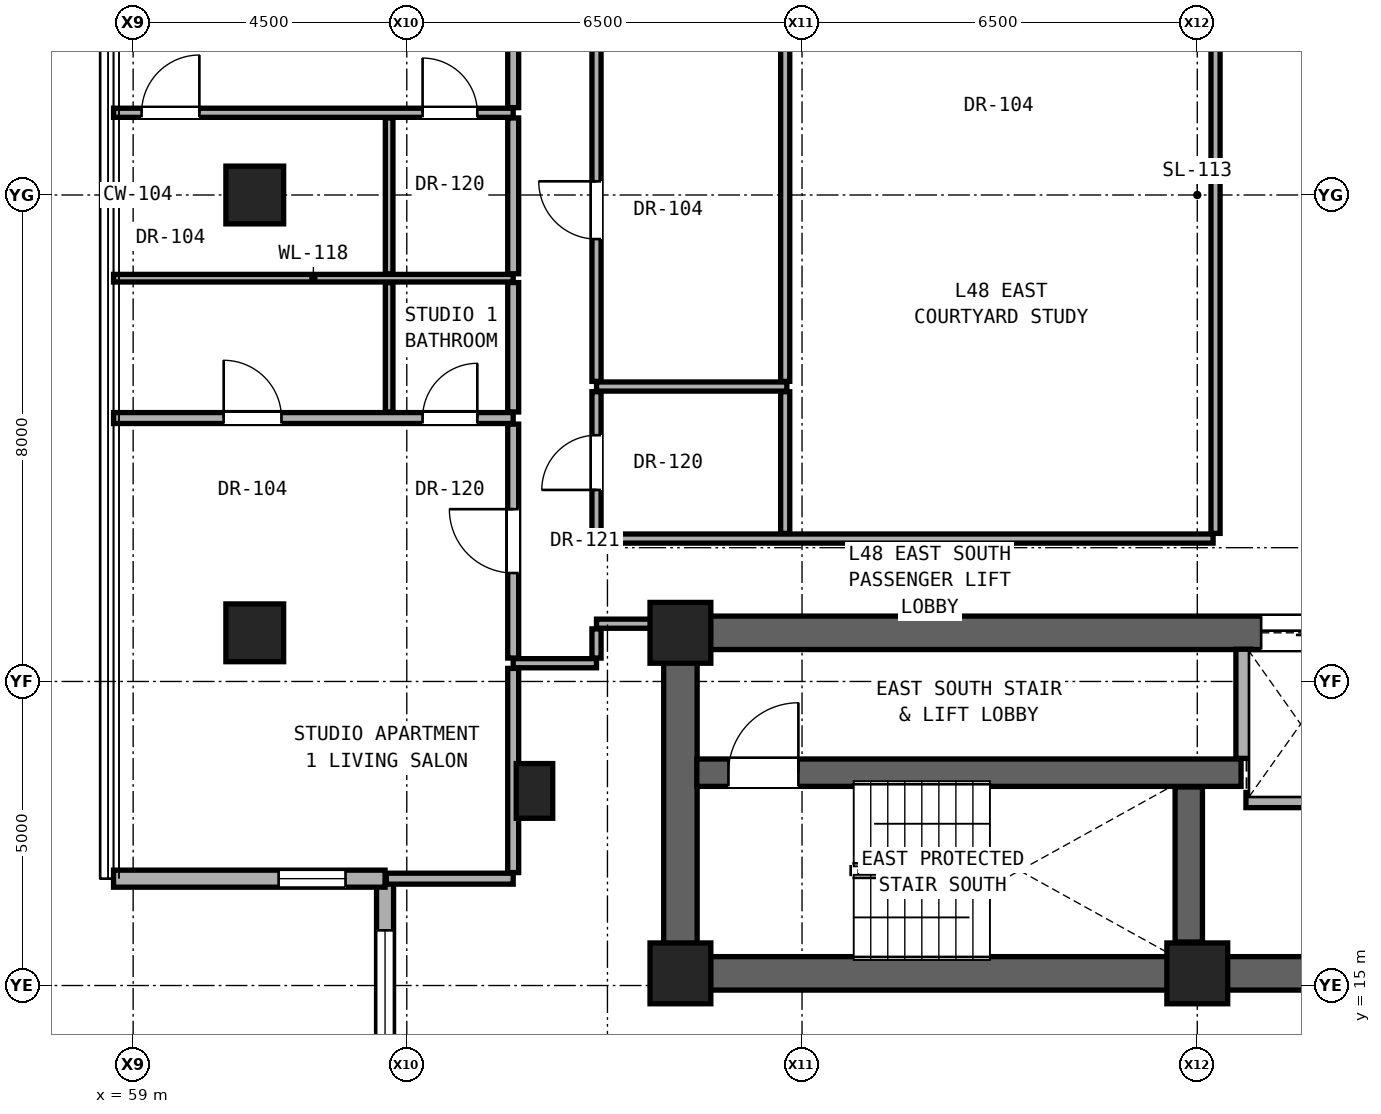
"""IFC4 building model, lengths in metres.
Left out: names, types, materials, properties, quantities, classifications, styles, units other than length and angle.
Written with IfcOpenShell. Run it as: python <this file> out.ifc"""

import sys

from ifc_helpers import new_model, si_unit, direction, frame, frame_2d, origin, origin_2d, place, context, subcontext, project, spatial, rectangle, hollow_rectangle, extrude, element, fill, save


model = new_model("IFC4")
c1 = context("Model", 3, precision=1e-05, world=origin(), true_north=direction((0.0, 1.0)))
c2 = subcontext(c1, "Body", "Model", "MODEL_VIEW")
j1 = project(units=[si_unit("LENGTHUNIT", "METRE"), si_unit("PLANEANGLEUNIT", "RADIAN")], contexts=[c1])
p1 = place(None, origin())
s1 = spatial("IfcSite", under=j1, at=p1, CompositionType="ELEMENT")
p2 = place(p1, origin())
s2 = spatial("IfcBuilding", under=s1, at=p2, CompositionType="ELEMENT")
p3 = place(p2, frame((0.0, 0.0, 170.65)))
s3 = spatial("IfcBuildingStorey", under=s2, at=p3, CompositionType="ELEMENT", Elevation=170.65)
for number, where, z_axis, x_axis in (
    (1, (68.0, 15.2, 0.0), (0.0, 0.0, 1.0), (1.0, 0.0, 0.0)),
    (2, (76.5, 15.2, 0.0), (0.0, 0.0, 1.0), (1.0, 0.0, 0.0)),
    (3, (68.0, 20.8, 0.0), (0.0, 0.0, 1.0), (1.0, 0.0, 0.0)),
):
    element("IfcColumn", number, at=place(p3, frame(where, z_axis=z_axis, x_axis=x_axis)), inside=s3, PredefinedType="COLUMN", context=c2, shape_type="SweptSolid", body=[
        extrude(rectangle(XDim=1.0, YDim=1.0, at=origin_2d()), origin(), (0.0, 0.0, 1.0), 3.25),
    ])
for number, where, z_axis, x_axis in (
    (4, (61.0, 20.8, 0.0), (0.0, 0.0, 1.0), (1.0, 0.0, 0.0)),
    (5, (61.0, 28.0, 0.0), (0.0, 0.0, 1.0), (1.0, 0.0, 0.0)),
):
    element("IfcColumn", number, at=place(p3, frame(where, z_axis=z_axis, x_axis=x_axis)), inside=s3, PredefinedType="COLUMN", context=c2, shape_type="SweptSolid", body=[
        extrude(hollow_rectangle(XDim=0.95, YDim=0.95, WallThickness=0.05, at=origin_2d()), origin(), (0.0, 0.0, 1.0), 3.25),
    ])
p4 = place(p3, frame((65.6, 18.2, 0.0), z_axis=(0.0, 0.0, 1.0), x_axis=(1.0, 0.0, 0.0)))
e6 = element("IfcColumn", 6, at=p4, inside=s3, PredefinedType="PILASTER", context=c2, shape_type="SweptSolid", body=[
    extrude(rectangle(XDim=0.6, YDim=0.9, at=origin_2d()), origin(), (0.0, 0.0, 1.0), 3.25),
])
p5 = place(p3, frame((68.0, 15.2, 0.0), z_axis=(0.0, 0.0, 1.0), x_axis=(1.0, 0.0, 0.0)))
e7 = element("IfcWall", 7, at=p5, inside=s3, PredefinedType="SHEAR", context=c2, shape_type="SweptSolid", body=[
    extrude(rectangle(XDim=17.0, YDim=0.55, at=frame_2d((8.5, 0.0))), origin(), (0.0, 0.0, 1.0), 3.05),
])
p6 = place(p3, frame((68.0, 15.2, 0.0), z_axis=(0.0, 0.0, 1.0), x_axis=(0.0, 1.0, 0.0)))
e8 = element("IfcWall", 8, at=p6, inside=s3, PredefinedType="SHEAR", context=c2, shape_type="SweptSolid", body=[
    extrude(rectangle(XDim=5.6, YDim=0.55, at=frame_2d((2.8, 0.0))), origin(), (0.0, 0.0, 1.0), 3.05),
])
p7 = place(p3, frame((68.0, 20.8, 0.0), z_axis=(0.0, 0.0, 1.0), x_axis=(1.0, 0.0, 0.0)))
e9 = element("IfcWall", 9, at=p7, inside=s3, PredefinedType="SHEAR", context=c2, shape_type="SweptSolid", body=[
    extrude(rectangle(XDim=17.0, YDim=0.55, at=frame_2d((8.5, 0.0))), origin(), (0.0, 0.0, 1.0), 3.05),
])
p8 = place(p7, frame((9.55, 0.0, 0.0)))
e10 = element("IfcOpeningElement", 10, at=p8, cuts=e9, PredefinedType="OPENING", context=c2, shape_type="SweptSolid", body=[
    extrude(rectangle(XDim=1.3, YDim=2.3, at=frame_2d((0.65, 1.15))), frame((0.0, 0.285, 0.0), z_axis=(0.0, -1.0, 0.0), x_axis=(1.0, 0.0, 0.0)), (0.0, 0.0, 1.0), 0.57),
])
p9 = place(p7, frame((12.05, 0.0, 0.0)))
e11 = element("IfcOpeningElement", 11, at=p9, cuts=e9, PredefinedType="OPENING", context=c2, shape_type="SweptSolid", body=[
    extrude(rectangle(XDim=1.3, YDim=2.3, at=frame_2d((0.65, 1.15))), frame((0.0, 0.285, 0.0), z_axis=(0.0, -1.0, 0.0), x_axis=(1.0, 0.0, 0.0)), (0.0, 0.0, 1.0), 0.57),
])
p10 = place(p3, frame((63.143, 16.757, 0.0), z_axis=(0.0, 0.0, 1.0), x_axis=(0.0, -1.0, 0.0)))
e12 = element("IfcWall", 12, at=p10, inside=s3, PredefinedType="SOLIDWALL", context=c2, shape_type="SweptSolid", body=[
    extrude(rectangle(XDim=4.465, YDim=0.28, at=frame_2d((2.232, 0.0))), origin(), (0.0, 0.0, 1.0), 3.03),
])
p11 = place(p10, frame((0.85, 0.0, 0.68)))
e13 = element("IfcOpeningElement", 13, at=p11, cuts=e12, PredefinedType="OPENING", context=c2, shape_type="SweptSolid", body=[
    extrude(rectangle(XDim=2.1, YDim=2.2, at=frame_2d((1.05, 1.1))), frame((0.0, 0.15, 0.0), z_axis=(0.0, -1.0, 0.0), x_axis=(1.0, 0.0, 0.0)), (0.0, 0.0, 1.0), 0.3),
])
p12 = place(p3, frame((58.677, 16.757, 0.0), z_axis=(0.0, 0.0, 1.0), x_axis=(1.0, 0.0, 0.0)))
e14 = element("IfcWall", 14, at=p12, inside=s3, PredefinedType="SOLIDWALL", context=c2, shape_type="SweptSolid", body=[
    extrude(rectangle(XDim=4.465, YDim=0.28, at=frame_2d((2.232, 0.0))), origin(), (0.0, 0.0, 1.0), 3.03),
])
p13 = place(p12, frame((2.715, 0.0, 0.85)))
e15 = element("IfcOpeningElement", 15, at=p13, cuts=e14, PredefinedType="OPENING", context=c2, shape_type="SweptSolid", body=[
    extrude(rectangle(XDim=1.1, YDim=2.0, at=frame_2d((0.55, 1.0))), frame((0.0, 0.15, 0.0), z_axis=(0.0, -1.0, 0.0), x_axis=(1.0, 0.0, 0.0)), (0.0, 0.0, 1.0), 0.3),
])
p14 = place(p3, frame((63.163, 16.757, 0.0), z_axis=(0.0, 0.0, 1.0), x_axis=(1.0, 0.0, 0.0)))
e16 = element("IfcWall", 16, at=p14, inside=s3, PredefinedType="PARTITIONING", context=c2, shape_type="SweptSolid", body=[
    extrude(rectangle(XDim=2.087, YDim=0.18, at=frame_2d((1.044, 0.0))), origin(), (0.0, 0.0, 1.0), 3.05),
])
p15 = place(p3, frame((77.3, 18.05, 0.0), z_axis=(0.0, 0.0, 1.0), x_axis=(1.0, 0.0, 0.0)))
e17 = element("IfcWall", 17, at=p15, inside=s3, PredefinedType="SOLIDWALL", context=c2, shape_type="SweptSolid", body=[
    extrude(rectangle(XDim=4.35, YDim=0.25, at=frame_2d((2.175, 0.0))), origin(), (0.0, 0.0, 1.0), 3.05),
])
p16 = place(p3, frame((68.27, 18.5, 0.0), z_axis=(0.0, 0.0, 1.0), x_axis=(1.0, 0.0, 0.0)))
e18 = element("IfcWall", 18, at=p16, inside=s3, PredefinedType="SHEAR", context=c2, shape_type="SweptSolid", body=[
    extrude(rectangle(XDim=8.95, YDim=0.45, at=frame_2d((4.475, 0.0))), origin(), (0.0, 0.0, 1.0), 3.05),
])
p17 = place(p16, frame((0.52, 0.0, 0.0)))
e19 = element("IfcOpeningElement", 19, at=p17, cuts=e18, PredefinedType="OPENING", context=c2, shape_type="SweptSolid", body=[
    extrude(rectangle(XDim=1.15, YDim=2.2, at=frame_2d((0.575, 1.1))), frame((0.0, 0.235, 0.0), z_axis=(0.0, -1.0, 0.0), x_axis=(1.0, 0.0, 0.0)), (0.0, 0.0, 1.0), 0.47),
])
p18 = place(p3, frame((65.25, 20.3, 0.0), z_axis=(0.0, 0.0, 1.0), x_axis=(1.0, 0.0, 0.0)))
e20 = element("IfcWall", 20, at=p18, inside=s3, PredefinedType="PARTITIONING", context=c2, shape_type="SweptSolid", body=[
    extrude(rectangle(XDim=1.37, YDim=0.15, at=frame_2d((0.685, 0.0))), origin(), (0.0, 0.0, 1.0), 3.05),
])
p19 = place(p3, frame((66.62, 20.95, 0.0), z_axis=(0.0, 0.0, 1.0), x_axis=(1.0, 0.0, 0.0)))
e21 = element("IfcWall", 21, at=p19, inside=s3, PredefinedType="PARTITIONING", context=c2, shape_type="SweptSolid", body=[
    extrude(rectangle(XDim=1.11, YDim=0.15, at=frame_2d((0.555, 0.0))), origin(), (0.0, 0.0, 1.0), 2.442),
])
p20 = place(p3, frame((66.62, 22.35, 0.0), z_axis=(0.0, 0.0, 1.0), x_axis=(1.0, 0.0, 0.0)))
e22 = element("IfcWall", 22, at=p20, inside=s3, PredefinedType="PARTITIONING", context=c2, shape_type="SweptSolid", body=[
    extrude(rectangle(XDim=10.14, YDim=0.15, at=frame_2d((5.07, 0.0))), origin(), (0.0, 0.0, 1.0), 2.186),
])
p21 = place(p3, frame((58.678, 24.332, 0.0), z_axis=(0.0, 0.0, 1.0), x_axis=(1.0, 0.0, 0.0)))
e23 = element("IfcWall", 23, at=p21, inside=s3, PredefinedType="PARTITIONING", context=c2, shape_type="SweptSolid", body=[
    extrude(rectangle(XDim=6.572, YDim=0.18, at=frame_2d((3.286, 0.0))), origin(), (0.0, 0.0, 1.0), 2.269),
])
p22 = place(p21, frame((1.811, 0.0, 0.0)))
e24 = element("IfcOpeningElement", 24, at=p22, cuts=e23, PredefinedType="OPENING", context=c2, shape_type="SweptSolid", body=[
    extrude(rectangle(XDim=0.95, YDim=2.15, at=frame_2d((0.475, 1.075))), frame((0.0, 0.1, 0.0), z_axis=(0.0, -1.0, 0.0), x_axis=(1.0, 0.0, 0.0)), (0.0, 0.0, 1.0), 0.2),
])
p23 = place(p21, frame((5.082, 0.0, 0.0)))
e25 = element("IfcOpeningElement", 25, at=p23, cuts=e23, PredefinedType="OPENING", context=c2, shape_type="SweptSolid", body=[
    extrude(rectangle(XDim=0.9, YDim=2.1, at=frame_2d((0.45, 1.05))), frame((0.0, 0.1, 0.0), z_axis=(0.0, -1.0, 0.0), x_axis=(1.0, 0.0, 0.0)), (0.0, 0.0, 1.0), 0.2),
])
p24 = place(p3, frame((66.62, 24.85, 0.0), z_axis=(0.0, 0.0, 1.0), x_axis=(1.0, 0.0, 0.0)))
e26 = element("IfcWall", 26, at=p24, inside=s3, PredefinedType="PARTITIONING", context=c2, shape_type="SweptSolid", body=[
    extrude(rectangle(XDim=3.13, YDim=0.15, at=frame_2d((1.565, 0.0))), origin(), (0.0, 0.0, 1.0), 2.186),
])
p25 = place(p3, frame((58.678, 26.632, 0.0), z_axis=(0.0, 0.0, 1.0), x_axis=(1.0, 0.0, 0.0)))
e27 = element("IfcWall", 27, at=p25, inside=s3, PredefinedType="PARTITIONING", context=c2, shape_type="SweptSolid", body=[
    extrude(rectangle(XDim=6.572, YDim=0.125, at=frame_2d((3.286, 0.0))), origin(), (0.0, 0.0, 1.0), 2.269),
])
p26 = place(p3, frame((58.678, 29.352, 0.0), z_axis=(0.0, 0.0, 1.0), x_axis=(1.0, 0.0, 0.0)))
e28 = element("IfcWall", 28, at=p26, inside=s3, PredefinedType="PARTITIONING", context=c2, shape_type="SweptSolid", body=[
    extrude(rectangle(XDim=6.572, YDim=0.15, at=frame_2d((3.286, 0.0))), origin(), (0.0, 0.0, 1.0), 2.269),
])
p27 = place(p26, frame((0.461, 0.0, 0.0)))
e29 = element("IfcOpeningElement", 29, at=p27, cuts=e28, PredefinedType="OPENING", context=c2, shape_type="SweptSolid", body=[
    extrude(rectangle(XDim=0.95, YDim=2.15, at=frame_2d((0.475, 1.075))), frame((0.0, 0.085, 0.0), z_axis=(0.0, -1.0, 0.0), x_axis=(1.0, 0.0, 0.0)), (0.0, 0.0, 1.0), 0.17),
])
p28 = place(p26, frame((5.082, 0.0, 0.0)))
e30 = element("IfcOpeningElement", 30, at=p28, cuts=e28, PredefinedType="OPENING", context=c2, shape_type="SweptSolid", body=[
    extrude(rectangle(XDim=0.9, YDim=2.1, at=frame_2d((0.45, 1.05))), frame((0.0, 0.085, 0.0), z_axis=(0.0, -1.0, 0.0), x_axis=(1.0, 0.0, 0.0)), (0.0, 0.0, 1.0), 0.17),
])
p29 = place(p3, frame((63.21, 24.432, 0.0), z_axis=(0.0, 0.0, 1.0), x_axis=(0.0, 1.0, 0.0)))
e31 = element("IfcWall", 31, at=p29, inside=s3, PredefinedType="PARTITIONING", context=c2, shape_type="SweptSolid", body=[
    extrude(rectangle(XDim=2.128, YDim=0.125, at=frame_2d((1.064, 0.0))), origin(), (0.0, 0.0, 1.0), 3.05),
])
p30 = place(p3, frame((63.21, 26.705, 0.0), z_axis=(0.0, 0.0, 1.0), x_axis=(0.0, 1.0, 0.0)))
e32 = element("IfcWall", 32, at=p30, inside=s3, PredefinedType="PARTITIONING", context=c2, shape_type="SweptSolid", body=[
    extrude(rectangle(XDim=2.562, YDim=0.125, at=frame_2d((1.281, 0.0))), origin(), (0.0, 0.0, 1.0), 2.346),
])
p31 = place(p3, frame((65.25, 16.857, 0.0), z_axis=(0.0, 0.0, 1.0), x_axis=(0.0, 1.0, 0.0)))
e33 = element("IfcWall", 33, at=p31, inside=s3, PredefinedType="PARTITIONING", context=c2, shape_type="SweptSolid", body=[
    extrude(rectangle(XDim=3.358, YDim=0.18, at=frame_2d((1.679, 0.0))), origin(), (0.0, 0.0, 1.0), 2.493),
])
p32 = place(p3, frame((65.25, 20.385, 0.0), z_axis=(0.0, 0.0, 1.0), x_axis=(0.0, 1.0, 0.0)))
e34 = element("IfcWall", 34, at=p32, inside=s3, PredefinedType="PARTITIONING", context=c2, shape_type="SweptSolid", body=[
    extrude(rectangle(XDim=3.847, YDim=0.18, at=frame_2d((1.923, 0.0))), origin(), (0.0, 0.0, 1.0), 2.442),
])
p33 = place(p32, frame((1.398, 0.0, 0.0)))
e35 = element("IfcOpeningElement", 35, at=p33, cuts=e34, PredefinedType="OPENING", context=c2, shape_type="SweptSolid", body=[
    extrude(rectangle(XDim=1.05, YDim=2.2, at=frame_2d((0.525, 1.1))), frame((0.0, 0.1, 0.0), z_axis=(0.0, -1.0, 0.0), x_axis=(1.0, 0.0, 0.0)), (0.0, 0.0, 1.0), 0.2),
])
p34 = place(p3, frame((65.25, 24.432, 0.0), z_axis=(0.0, 0.0, 1.0), x_axis=(0.0, 1.0, 0.0)))
e36 = element("IfcWall", 36, at=p34, inside=s3, PredefinedType="PARTITIONING", context=c2, shape_type="SweptSolid", body=[
    extrude(rectangle(XDim=2.128, YDim=0.18, at=frame_2d((1.064, 0.0))), origin(), (0.0, 0.0, 1.0), 3.05),
])
p35 = place(p3, frame((65.25, 26.705, 0.0), z_axis=(0.0, 0.0, 1.0), x_axis=(0.0, 1.0, 0.0)))
e37 = element("IfcWall", 37, at=p35, inside=s3, PredefinedType="PARTITIONING", context=c2, shape_type="SweptSolid", body=[
    extrude(rectangle(XDim=2.562, YDim=0.18, at=frame_2d((1.281, 0.0))), origin(), (0.0, 0.0, 1.0), 2.346),
])
p36 = place(p3, frame((65.25, 29.437, 0.0), z_axis=(0.0, 0.0, 1.0), x_axis=(0.0, 1.0, 0.0)))
e38 = element("IfcWall", 38, at=p36, inside=s3, PredefinedType="PARTITIONING", context=c2, shape_type="SweptSolid", body=[
    extrude(rectangle(XDim=6.178, YDim=0.18, at=frame_2d((3.089, 0.0))), origin(), (0.0, 0.0, 1.0), 2.442),
])
p37 = place(p36, frame((2.564, 0.0, 0.0)))
e39 = element("IfcOpeningElement", 39, at=p37, cuts=e38, PredefinedType="OPENING", context=c2, shape_type="SweptSolid", body=[
    extrude(rectangle(XDim=1.05, YDim=2.2, at=frame_2d((0.525, 1.1))), frame((0.0, 0.1, 0.0), z_axis=(0.0, -1.0, 0.0), x_axis=(1.0, 0.0, 0.0)), (0.0, 0.0, 1.0), 0.2),
])
p38 = place(p3, frame((66.62, 20.385, 0.0), z_axis=(0.0, 0.0, 1.0), x_axis=(0.0, 1.0, 0.0)))
e40 = element("IfcWall", 40, at=p38, inside=s3, PredefinedType="PARTITIONING", context=c2, shape_type="SweptSolid", body=[
    extrude(rectangle(XDim=0.48, YDim=0.15, at=frame_2d((0.24, 0.0))), origin(), (0.0, 0.0, 1.0), 2.442),
])
p39 = place(p3, frame((66.62, 22.435, 0.0), z_axis=(0.0, 0.0, 1.0), x_axis=(0.0, 1.0, 0.0)))
e41 = element("IfcWall", 41, at=p39, inside=s3, PredefinedType="PARTITIONING", context=c2, shape_type="SweptSolid", body=[
    extrude(rectangle(XDim=2.33, YDim=0.15, at=frame_2d((1.165, 0.0))), origin(), (0.0, 0.0, 1.0), 3.05),
])
p40 = place(p39, frame((0.715, 0.0, 0.0)))
e42 = element("IfcOpeningElement", 42, at=p40, cuts=e41, PredefinedType="OPENING", context=c2, shape_type="SweptSolid", body=[
    extrude(rectangle(XDim=0.9, YDim=2.1, at=frame_2d((0.45, 1.05))), frame((0.0, 0.085, 0.0), z_axis=(0.0, -1.0, 0.0), x_axis=(1.0, 0.0, 0.0)), (0.0, 0.0, 1.0), 0.17),
])
p41 = place(p3, frame((66.62, 24.935, 0.0), z_axis=(0.0, 0.0, 1.0), x_axis=(0.0, 1.0, 0.0)))
e43 = element("IfcWall", 43, at=p41, inside=s3, PredefinedType="PARTITIONING", context=c2, shape_type="SweptSolid", body=[
    extrude(rectangle(XDim=5.63, YDim=0.15, at=frame_2d((2.815, 0.0))), origin(), (0.0, 0.0, 1.0), 2.346),
])
p42 = place(p41, frame((2.34, 0.0, 0.0)))
e44 = element("IfcOpeningElement", 44, at=p42, cuts=e43, PredefinedType="OPENING", context=c2, shape_type="SweptSolid", body=[
    extrude(rectangle(XDim=0.95, YDim=2.15, at=frame_2d((0.475, 1.075))), frame((0.0, 0.085, 0.0), z_axis=(0.0, -1.0, 0.0), x_axis=(1.0, 0.0, 0.0)), (0.0, 0.0, 1.0), 0.17),
])
p43 = place(p3, frame((69.723, 22.435, 0.0), z_axis=(0.0, 0.0, 1.0), x_axis=(0.0, 1.0, 0.0)))
e45 = element("IfcWall", 45, at=p43, inside=s3, PredefinedType="PARTITIONING", context=c2, shape_type="SweptSolid", body=[
    extrude(rectangle(XDim=2.33, YDim=0.15, at=frame_2d((1.165, 0.0))), origin(), (0.0, 0.0, 1.0), 3.05),
])
p44 = place(p3, frame((69.723, 24.935, 0.0), z_axis=(0.0, 0.0, 1.0), x_axis=(0.0, 1.0, 0.0)))
e46 = element("IfcWall", 46, at=p44, inside=s3, PredefinedType="PARTITIONING", context=c2, shape_type="SweptSolid", body=[
    extrude(rectangle(XDim=5.63, YDim=0.15, at=frame_2d((2.815, 0.0))), origin(), (0.0, 0.0, 1.0), 2.186),
])
p45 = place(p3, frame((76.36, 15.715, 0.0), z_axis=(0.0, 0.0, 1.0), x_axis=(0.0, 1.0, 0.0)))
e47 = element("IfcWall", 47, at=p45, inside=s3, PredefinedType="SHEAR", context=c2, shape_type="SweptSolid", body=[
    extrude(rectangle(XDim=2.55, YDim=0.45, at=frame_2d((1.275, 0.0))), origin(), (0.0, 0.0, 1.0), 3.05),
])
p46 = place(p3, frame((76.8, 22.435, 0.0), z_axis=(0.0, 0.0, 1.0), x_axis=(0.0, 1.0, 0.0)))
e48 = element("IfcWall", 48, at=p46, inside=s3, PredefinedType="PARTITIONING", context=c2, shape_type="SweptSolid", body=[
    extrude(rectangle(XDim=8.13, YDim=0.15, at=frame_2d((4.065, 0.0))), origin(), (0.0, 0.0, 1.0), 2.186),
])
p47 = place(p3, frame((77.26, 18.735, 0.0), z_axis=(0.0, 0.0, 1.0), x_axis=(0.0, 1.0, 0.0)))
e49 = element("IfcWall", 49, at=p47, inside=s3, PredefinedType="SOLIDWALL", context=c2, shape_type="SweptSolid", body=[
    extrude(rectangle(XDim=1.795, YDim=0.25, at=frame_2d((0.897, 0.0))), origin(), (0.0, 0.0, 1.0), 3.05),
])
p48 = place(p11, origin())
e50 = element("IfcWindow", 50, at=p48, inside=s3, PartitioningType="SINGLE_PANEL", PredefinedType="WINDOW", context=c2, shape_type="SweptSolid", body=[
    extrude(rectangle(XDim=2.1, YDim=2.2, at=frame_2d((1.05, 1.1))), frame((0.0, 0.03, 0.0), z_axis=(0.0, -1.0, 0.0), x_axis=(1.0, 0.0, 0.0)), (0.0, 0.0, 1.0), 0.06),
])
fill(e13, e50)
p49 = place(p13, origin())
e51 = element("IfcWindow", 51, at=p49, inside=s3, PartitioningType="SINGLE_PANEL", PredefinedType="WINDOW", context=c2, shape_type="SweptSolid", body=[
    extrude(rectangle(XDim=1.1, YDim=2.0, at=frame_2d((0.55, 1.0))), frame((0.0, 0.03, 0.0), z_axis=(0.0, -1.0, 0.0), x_axis=(1.0, 0.0, 0.0)), (0.0, 0.0, 1.0), 0.06),
])
fill(e15, e51)
p50 = place(p17, origin())
e52 = element("IfcDoor", 52, at=p50, inside=s3, OperationType="SINGLE_SWING_RIGHT", PredefinedType="DOOR", context=c2, shape_type="SweptSolid", body=[
    extrude(rectangle(XDim=1.15, YDim=2.2, at=frame_2d((0.575, 1.1))), frame((0.0, 0.025, 0.0), z_axis=(0.0, -1.0, 0.0), x_axis=(1.0, 0.0, 0.0)), (0.0, 0.0, 1.0), 0.05),
])
fill(e19, e52)
p51 = place(p40, origin())
e53 = element("IfcDoor", 53, at=p51, inside=s3, OperationType="SINGLE_SWING_LEFT", PredefinedType="DOOR", context=c2, shape_type="SweptSolid", body=[
    extrude(rectangle(XDim=0.9, YDim=2.1, at=frame_2d((0.45, 1.05))), frame((0.0, 0.025, 0.0), z_axis=(0.0, -1.0, 0.0), x_axis=(1.0, 0.0, 0.0)), (0.0, 0.0, 1.0), 0.05),
])
fill(e42, e53)
p52 = place(p33, origin())
e54 = element("IfcDoor", 54, at=p52, inside=s3, OperationType="SINGLE_SWING_RIGHT", PredefinedType="DOOR", context=c2, shape_type="SweptSolid", body=[
    extrude(rectangle(XDim=1.05, YDim=2.2, at=frame_2d((0.525, 1.1))), frame((0.0, 0.025, 0.0), z_axis=(0.0, -1.0, 0.0), x_axis=(1.0, 0.0, 0.0)), (0.0, 0.0, 1.0), 0.05),
])
fill(e35, e54)
p53 = place(p22, origin())
e55 = element("IfcDoor", 55, at=p53, inside=s3, OperationType="SINGLE_SWING_LEFT", PredefinedType="DOOR", context=c2, shape_type="SweptSolid", body=[
    extrude(rectangle(XDim=0.95, YDim=2.15, at=frame_2d((0.475, 1.075))), frame((0.0, 0.025, 0.0), z_axis=(0.0, -1.0, 0.0), x_axis=(1.0, 0.0, 0.0)), (0.0, 0.0, 1.0), 0.05),
])
fill(e24, e55)
p54 = place(p23, origin())
e56 = element("IfcDoor", 56, at=p54, inside=s3, OperationType="SINGLE_SWING_RIGHT", PredefinedType="DOOR", context=c2, shape_type="SweptSolid", body=[
    extrude(rectangle(XDim=0.9, YDim=2.1, at=frame_2d((0.45, 1.05))), frame((0.0, 0.025, 0.0), z_axis=(0.0, -1.0, 0.0), x_axis=(1.0, 0.0, 0.0)), (0.0, 0.0, 1.0), 0.05),
])
fill(e25, e56)
p55 = place(p27, origin())
e57 = element("IfcDoor", 57, at=p55, inside=s3, OperationType="SINGLE_SWING_RIGHT", PredefinedType="DOOR", context=c2, shape_type="SweptSolid", body=[
    extrude(rectangle(XDim=0.95, YDim=2.15, at=frame_2d((0.475, 1.075))), frame((0.0, 0.025, 0.0), z_axis=(0.0, -1.0, 0.0), x_axis=(1.0, 0.0, 0.0)), (0.0, 0.0, 1.0), 0.05),
])
fill(e29, e57)
p56 = place(p28, origin())
e58 = element("IfcDoor", 58, at=p56, inside=s3, OperationType="SINGLE_SWING_LEFT", PredefinedType="DOOR", context=c2, shape_type="SweptSolid", body=[
    extrude(rectangle(XDim=0.9, YDim=2.1, at=frame_2d((0.45, 1.05))), frame((0.0, 0.025, 0.0), z_axis=(0.0, -1.0, 0.0), x_axis=(1.0, 0.0, 0.0)), (0.0, 0.0, 1.0), 0.05),
])
fill(e30, e58)
p57 = place(p42, origin())
e59 = element("IfcDoor", 59, at=p57, inside=s3, OperationType="SINGLE_SWING_RIGHT", PredefinedType="DOOR", context=c2, shape_type="SweptSolid", body=[
    extrude(rectangle(XDim=0.95, YDim=2.15, at=frame_2d((0.475, 1.075))), frame((0.0, 0.025, 0.0), z_axis=(0.0, -1.0, 0.0), x_axis=(1.0, 0.0, 0.0)), (0.0, 0.0, 1.0), 0.05),
])
fill(e44, e59)
p58 = place(p8, origin())
e60 = element("IfcDoor", 60, at=p58, inside=s3, OperationType="DOUBLE_DOOR_SLIDING", PredefinedType="DOOR", context=c2, shape_type="SweptSolid", body=[
    extrude(rectangle(XDim=1.3, YDim=2.3, at=frame_2d((0.65, 1.15))), frame((0.0, 0.025, 0.0), z_axis=(0.0, -1.0, 0.0), x_axis=(1.0, 0.0, 0.0)), (0.0, 0.0, 1.0), 0.05),
])
fill(e10, e60)
save(model, sys.argv[1])
